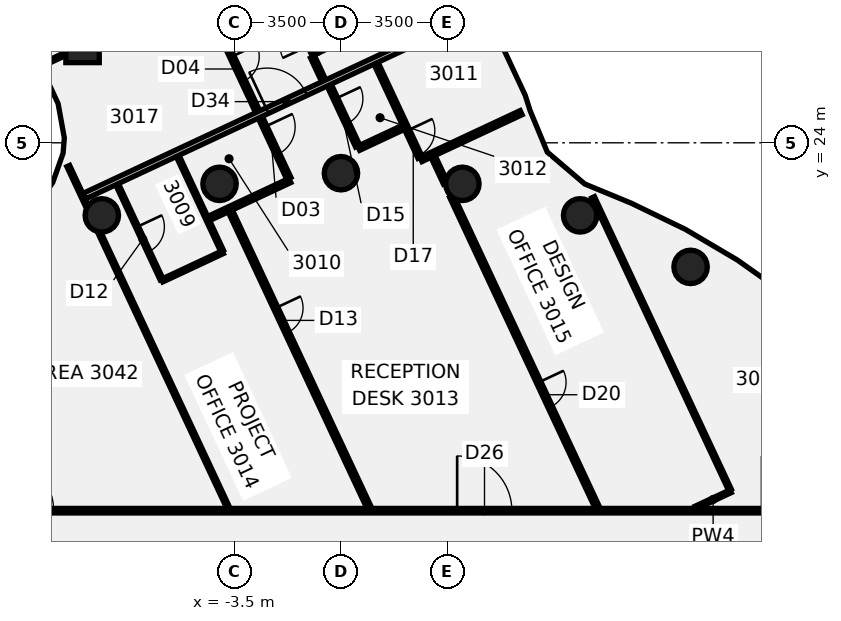
"""IFC4 building model, lengths in metres.
Left out: names, types, materials, properties, quantities, classifications, styles, units other than length and angle.
Written with IfcOpenShell. Run it as: python <this file> out.ifc"""

import sys

from ifc_helpers import new_model, si_unit, direction, frame, frame_2d, origin, origin_2d, place, context, subcontext, project, spatial, rectangle, circle, extrude, element, fill, save


model = new_model("IFC4")
c1 = context("Model", 3, precision=1e-05, world=origin(), true_north=direction((0.0, 1.0)))
c2 = subcontext(c1, "Body", "Model", "MODEL_VIEW")
j1 = project(units=[si_unit("LENGTHUNIT", "METRE"), si_unit("PLANEANGLEUNIT", "RADIAN")], contexts=[c1])
p1 = place(None, origin())
s1 = spatial("IfcSite", under=j1, at=p1, CompositionType="ELEMENT")
p2 = place(p1, origin())
s2 = spatial("IfcBuilding", under=s1, at=p2, CompositionType="ELEMENT")
p3 = place(p2, frame((0.0, 0.0, 124.75)))
s3 = spatial("IfcBuildingStorey", under=s2, at=p3, CompositionType="ELEMENT", Elevation=124.75)
for number, where, z_axis, x_axis in (
    (1, (11.5, 19.919, -0.14), (0.0, 0.0, 1.0), (1.0, 0.0, 0.0)),
    (2, (7.866, 21.613, -0.14), (0.0, 0.0, 1.0), (1.0, 0.0, 0.0)),
    (3, (3.994, 22.651, -0.14), (0.0, 0.0, 1.0), (1.0, 0.0, 0.0)),
    (4, (0.0, 23.0, -0.14), (0.0, 0.0, 1.0), (1.0, 0.0, 0.0)),
    (5, (-3.994, 22.651, -0.14), (0.0, 0.0, 1.0), (1.0, 0.0, 0.0)),
    (6, (-7.866, 21.613, -0.14), (0.0, 0.0, 1.0), (1.0, 0.0, 0.0)),
):
    element("IfcColumn", number, at=place(p3, frame(where, z_axis=z_axis, x_axis=x_axis)), inside=s3, PredefinedType="COLUMN", context=c2, shape_type="SweptSolid", body=[
        extrude(circle(Radius=0.55, at=origin_2d()), origin(), (0.0, 0.0, 1.0), 3.71),
    ])
p4 = place(p3, frame((-8.499, 27.187, -0.139), z_axis=(-0.025080401947, -0.041932325564, 0.998805613476), x_axis=(0.905336041768, 0.422762183328, 0.040481944421)))
e7 = element("IfcColumn", 7, at=p4, inside=s3, PredefinedType="COLUMN", context=c2, shape_type="SweptSolid", body=[
    extrude(rectangle(XDim=1.1, YDim=1.1, at=origin_2d()), origin(), (0.0, 0.0, 1.0), 3.709),
])
p5 = place(p3, frame((-10.294, 41.169, 0.0), z_axis=(0.0, 0.0, 1.0), x_axis=(0.423769207005, -0.905770202201, 0.0)))
e8 = element("IfcWall", 8, at=p5, inside=s3, PredefinedType="PARTITIONING", context=c2, shape_type="SweptSolid", body=[
    extrude(rectangle(XDim=20.246, YDim=0.15, at=frame_2d((10.123, 0.0))), origin(), (0.0, 0.0, 1.0), 2.87),
])
p6 = place(p5, frame((18.375, 0.0, 0.0)))
e9 = element("IfcOpeningElement", 9, at=p6, cuts=e8, PredefinedType="OPENING", context=c2, shape_type="SweptSolid", body=[
    extrude(rectangle(XDim=1.0, YDim=2.1, at=frame_2d((0.5, 1.05))), frame((0.0, 0.085, 0.0), z_axis=(0.0, -1.0, 0.0), x_axis=(1.0, 0.0, 0.0)), (0.0, 0.0, 1.0), 0.17),
])
p7 = place(p5, frame((15.825, 0.0, 0.0)))
e10 = element("IfcOpeningElement", 10, at=p7, cuts=e8, PredefinedType="OPENING", context=c2, shape_type="SweptSolid", body=[
    extrude(rectangle(XDim=0.9, YDim=2.1, at=frame_2d((0.45, 1.05))), frame((0.0, 0.085, 0.0), z_axis=(0.0, -1.0, 0.0), x_axis=(1.0, 0.0, 0.0)), (0.0, 0.0, 1.0), 0.17),
])
p8 = place(p5, frame((10.125, 0.0, 0.0)))
e11 = element("IfcOpeningElement", 11, at=p8, cuts=e8, PredefinedType="OPENING", context=c2, shape_type="SweptSolid", body=[
    extrude(rectangle(XDim=0.9, YDim=2.1, at=frame_2d((0.45, 1.05))), frame((0.0, 0.085, 0.0), z_axis=(0.0, -1.0, 0.0), x_axis=(1.0, 0.0, 0.0)), (0.0, 0.0, 1.0), 0.17),
])
p9 = place(p5, frame((6.825, 0.0, 0.0)))
e12 = element("IfcOpeningElement", 12, at=p9, cuts=e8, PredefinedType="OPENING", context=c2, shape_type="SweptSolid", body=[
    extrude(rectangle(XDim=0.9, YDim=2.1, at=frame_2d((0.45, 1.05))), frame((0.0, 0.085, 0.0), z_axis=(0.0, -1.0, 0.0), x_axis=(1.0, 0.0, 0.0)), (0.0, 0.0, 1.0), 0.17),
])
p10 = place(p5, frame((2.325, 0.0, 0.0)))
e13 = element("IfcOpeningElement", 13, at=p10, cuts=e8, PredefinedType="OPENING", context=c2, shape_type="SweptSolid", body=[
    extrude(rectangle(XDim=0.9, YDim=2.1, at=frame_2d((0.45, 1.05))), frame((0.0, 0.085, 0.0), z_axis=(0.0, -1.0, 0.0), x_axis=(1.0, 0.0, 0.0)), (0.0, 0.0, 1.0), 0.17),
])
p11 = place(p3, frame((-8.969, 23.236, 0.0), z_axis=(0.0, 0.0, 1.0), x_axis=(0.423755205879, -0.905776752567, 0.0)))
e14 = element("IfcWall", 14, at=p11, inside=s3, PredefinedType="PARTITIONING", context=c2, shape_type="SweptSolid", body=[
    extrude(rectangle(XDim=1.475, YDim=0.1, at=frame_2d((0.737, 0.0))), origin(), (0.0, 0.0, 1.0), 2.97),
])
p12 = place(p3, frame((-7.96, 21.078, 0.0), z_axis=(0.0, 0.0, 1.0), x_axis=(0.423844267344, -0.905735081047, 0.0)))
e15 = element("IfcWall", 15, at=p12, inside=s3, PredefinedType="PARTITIONING", context=c2, shape_type="SweptSolid", body=[
    extrude(rectangle(XDim=10.048, YDim=0.1, at=frame_2d((5.024, 0.0))), origin(), (0.0, 0.0, 1.0), 2.97),
])
p13 = place(p3, frame((-0.931, 26.82, 0.0), z_axis=(0.0, 0.0, 1.0), x_axis=(0.423786528485, -0.905762098056, 0.0)))
e16 = element("IfcWall", 16, at=p13, inside=s3, PredefinedType="PARTITIONING", context=c2, shape_type="SweptSolid", body=[
    extrude(rectangle(XDim=0.86, YDim=0.15, at=frame_2d((0.43, 0.0))), origin(), (0.0, 0.0, 1.0), 2.87),
])
p14 = place(p3, frame((-7.365, 22.638, 0.0), z_axis=(0.0, 0.0, 1.0), x_axis=(0.423671993632, -0.905815677614, 0.0)))
e17 = element("IfcWall", 17, at=p14, inside=s3, PredefinedType="PARTITIONING", context=c2, shape_type="SweptSolid", body=[
    extrude(rectangle(XDim=3.449, YDim=0.1, at=frame_2d((1.724, 0.0))), origin(), (0.0, 0.0, 1.0), 2.87),
])
p15 = place(p14, frame((1.55, 0.0, 0.0)))
e18 = element("IfcOpeningElement", 18, at=p15, cuts=e17, PredefinedType="OPENING", context=c2, shape_type="SweptSolid", body=[
    extrude(rectangle(XDim=0.9, YDim=2.1, at=frame_2d((0.45, 1.05))), frame((0.0, 0.06, 0.0), z_axis=(0.0, -1.0, 0.0), x_axis=(1.0, 0.0, 0.0)), (0.0, 0.0, 1.0), 0.12),
])
p16 = place(p3, frame((-5.371, 23.567, 0.0), z_axis=(0.0, 0.0, 1.0), x_axis=(0.423878271215, -0.90571916795, 0.0)))
e19 = element("IfcWall", 19, at=p16, inside=s3, PredefinedType="PARTITIONING", context=c2, shape_type="SweptSolid", body=[
    extrude(rectangle(XDim=3.446, YDim=0.1, at=frame_2d((1.723, 0.0))), origin(), (0.0, 0.0, 1.0), 2.87),
])
p17 = place(p3, frame((-3.641, 21.759, 0.0), z_axis=(0.0, 0.0, 1.0), x_axis=(0.423809726716, -0.905751243743, 0.0)))
e20 = element("IfcWall", 20, at=p17, inside=s3, PredefinedType="PARTITIONING", context=c2, shape_type="SweptSolid", body=[
    extrude(rectangle(XDim=10.785, YDim=0.15, at=frame_2d((5.393, 0.0))), origin(), (0.0, 0.0, 1.0), 2.97),
])
p18 = place(p17, frame((3.525, 0.0, 0.0)))
e21 = element("IfcOpeningElement", 21, at=p18, cuts=e20, PredefinedType="OPENING", context=c2, shape_type="SweptSolid", body=[
    extrude(rectangle(XDim=0.9, YDim=2.1, at=frame_2d((0.45, 1.05))), frame((0.0, 0.085, 0.0), z_axis=(0.0, -1.0, 0.0), x_axis=(1.0, 0.0, 0.0)), (0.0, 0.0, 1.0), 0.17),
])
p19 = place(p3, frame((-0.388, 25.898, 0.0), z_axis=(0.0, 0.0, 1.0), x_axis=(0.423693860777, -0.905805449498, 0.0)))
e22 = element("IfcWall", 22, at=p19, inside=s3, PredefinedType="PARTITIONING", context=c2, shape_type="SweptSolid", body=[
    extrude(rectangle(XDim=2.215, YDim=0.15, at=frame_2d((1.107, 0.0))), origin(), (0.0, 0.0, 1.0), 2.97),
])
p20 = place(p19, frame((0.495, 0.0, 0.0)))
e23 = element("IfcOpeningElement", 23, at=p20, cuts=e22, PredefinedType="OPENING", context=c2, shape_type="SweptSolid", body=[
    extrude(rectangle(XDim=0.9, YDim=2.1, at=frame_2d((0.45, 1.05))), frame((0.0, 0.085, 0.0), z_axis=(0.0, -1.0, 0.0), x_axis=(1.0, 0.0, 0.0)), (0.0, 0.0, 1.0), 0.17),
])
p21 = place(p3, frame((1.152, 26.618, 0.0), z_axis=(0.0, 0.0, 1.0), x_axis=(0.423667153788, -0.905817941311, 0.0)))
e24 = element("IfcWall", 24, at=p21, inside=s3, PredefinedType="PARTITIONING", context=c2, shape_type="SweptSolid", body=[
    extrude(rectangle(XDim=3.419, YDim=0.15, at=frame_2d((1.709, 0.0))), origin(), (0.0, 0.0, 1.0), 2.97),
])
p22 = place(p21, frame((2.444, 0.0, 0.0)))
e25 = element("IfcOpeningElement", 25, at=p22, cuts=e24, PredefinedType="OPENING", context=c2, shape_type="SweptSolid", body=[
    extrude(rectangle(XDim=0.9, YDim=2.1, at=frame_2d((0.45, 1.05))), frame((0.0, 0.085, 0.0), z_axis=(0.0, -1.0, 0.0), x_axis=(1.0, 0.0, 0.0)), (0.0, 0.0, 1.0), 0.17),
])
p23 = place(p3, frame((3.029, 23.551, 0.0), z_axis=(0.0, 0.0, 1.0), x_axis=(0.423795074158, -0.905758099671, 0.0)))
e26 = element("IfcWall", 26, at=p23, inside=s3, PredefinedType="PARTITIONING", context=c2, shape_type="SweptSolid", body=[
    extrude(rectangle(XDim=0.969, YDim=0.15, at=frame_2d((0.485, 0.0))), origin(), (0.0, 0.0, 1.0), 2.97),
])
p24 = place(p3, frame((3.644, 22.235, 0.0), z_axis=(0.0, 0.0, 1.0), x_axis=(0.423784513988, -0.905763040593, 0.0)))
e27 = element("IfcWall", 27, at=p24, inside=s3, PredefinedType="PARTITIONING", context=c2, shape_type="SweptSolid", body=[
    extrude(rectangle(XDim=11.311, YDim=0.15, at=frame_2d((5.655, 0.0))), origin(), (0.0, 0.0, 1.0), 2.97),
])
p25 = place(p24, frame((6.75, 0.0, 0.0)))
e28 = element("IfcOpeningElement", 28, at=p25, cuts=e27, PredefinedType="OPENING", context=c2, shape_type="SweptSolid", body=[
    extrude(rectangle(XDim=0.9, YDim=2.1, at=frame_2d((0.45, 1.05))), frame((0.0, 0.085, 0.0), z_axis=(0.0, -1.0, 0.0), x_axis=(1.0, 0.0, 0.0)), (0.0, 0.0, 1.0), 0.17),
])
p26 = place(p3, frame((8.293, 22.208, 0.0), z_axis=(0.0, 0.0, 1.0), x_axis=(0.423833818266, -0.905739970684, 0.0)))
e29 = element("IfcWall", 29, at=p26, inside=s3, PredefinedType="PARTITIONING", context=c2, shape_type="SweptSolid", body=[
    extrude(rectangle(XDim=10.624, YDim=0.1, at=frame_2d((5.312, 0.0))), origin(), (0.0, 0.0, 1.0), 2.97),
])
p27 = place(p3, frame((-17.065, 11.9, 0.0), z_axis=(0.0, 0.0, 1.0), x_axis=(1.0, 0.0, 0.0)))
e30 = element("IfcWall", 30, at=p27, inside=s3, PredefinedType="PARTITIONING", context=c2, shape_type="SweptSolid", body=[
    extrude(rectangle(XDim=34.165, YDim=0.15, at=frame_2d((17.083, 0.0))), origin(), (0.0, 0.0, 1.0), 2.97),
])
p28 = place(p27, frame((20.887, 0.0, 0.0)))
e31 = element("IfcOpeningElement", 31, at=p28, cuts=e30, PredefinedType="OPENING", context=c2, shape_type="SweptSolid", body=[
    extrude(rectangle(XDim=1.8, YDim=2.1, at=frame_2d((0.9, 1.05))), frame((0.0, 0.085, 0.0), z_axis=(0.0, -1.0, 0.0), x_axis=(1.0, 0.0, 0.0)), (0.0, 0.0, 1.0), 0.17),
])
p29 = place(p27, frame((30.913, 0.0, 0.0)))
e32 = element("IfcOpeningElement", 32, at=p29, cuts=e30, PredefinedType="OPENING", context=c2, shape_type="SweptSolid", body=[
    extrude(rectangle(XDim=1.8, YDim=2.1, at=frame_2d((0.9, 1.05))), frame((0.0, 0.085, 0.0), z_axis=(0.0, -1.0, 0.0), x_axis=(1.0, 0.0, 0.0)), (0.0, 0.0, 1.0), 0.17),
])
p30 = place(p27, frame((5.815, 0.0, 0.0)))
e33 = element("IfcOpeningElement", 33, at=p30, cuts=e30, PredefinedType="OPENING", context=c2, shape_type="SweptSolid", body=[
    extrude(rectangle(XDim=1.8, YDim=2.1, at=frame_2d((0.9, 1.05))), frame((0.0, 0.085, 0.0), z_axis=(0.0, -1.0, 0.0), x_axis=(1.0, 0.0, 0.0)), (0.0, 0.0, 1.0), 0.17),
])
p31 = place(p3, frame((11.666, 12.0, 0.0), z_axis=(0.0, 0.0, 1.0), x_axis=(0.905726309161, 0.423863011942, 0.0)))
e34 = element("IfcWall", 34, at=p31, inside=s3, PredefinedType="PARTITIONING", context=c2, shape_type="SweptSolid", body=[
    extrude(rectangle(XDim=1.271, YDim=0.1, at=frame_2d((0.636, 0.0))), origin(), (0.0, 0.0, 1.0), 2.97),
])
p32 = place(p3, frame((-9.613, 26.666, 0.0), z_axis=(0.0, 0.0, 1.0), x_axis=(0.905887159872, 0.423519130121, 0.0)))
e35 = element("IfcWall", 35, at=p32, inside=s3, PredefinedType="PARTITIONING", context=c2, shape_type="SweptSolid", body=[
    extrude(rectangle(XDim=0.506, YDim=0.1, at=frame_2d((0.253, 0.0))), origin(), (0.0, 0.0, 1.0), 2.97),
])
p33 = place(p3, frame((-8.44, 22.246, 0.0), z_axis=(0.0, 0.0, 1.0), x_axis=(0.905948211467, 0.423388519139, 0.0)))
e36 = element("IfcWall", 36, at=p33, inside=s3, PredefinedType="PARTITIONING", context=c2, shape_type="SweptSolid", body=[
    extrude(rectangle(XDim=14.239, YDim=0.2, at=frame_2d((7.119, 0.0))), origin(), (0.0, 0.0, 1.0), 2.87),
])
p34 = place(p33, frame((6.64, 0.0, 0.0)))
e37 = element("IfcOpeningElement", 37, at=p34, cuts=e36, PredefinedType="OPENING", context=c2, shape_type="SweptSolid", body=[
    extrude(rectangle(XDim=1.4, YDim=2.1, at=frame_2d((0.7, 1.05))), frame((0.0, 0.11, 0.0), z_axis=(0.0, -1.0, 0.0), x_axis=(1.0, 0.0, 0.0)), (0.0, 0.0, 1.0), 0.22),
])
p35 = place(p3, frame((-5.882, 19.469, 0.0), z_axis=(0.0, 0.0, 1.0), x_axis=(0.905879588514, 0.423535324517, 0.0)))
e38 = element("IfcWall", 38, at=p35, inside=s3, PredefinedType="PARTITIONING", context=c2, shape_type="SweptSolid", body=[
    extrude(rectangle(XDim=2.2, YDim=0.1, at=frame_2d((1.1, 0.0))), origin(), (0.0, 0.0, 1.0), 2.97),
])
p36 = place(p3, frame((2.633, 23.451, 0.0), z_axis=(0.0, 0.0, 1.0), x_axis=(0.905831155587, 0.42363889997, 0.0)))
e39 = element("IfcWall", 39, at=p36, inside=s3, PredefinedType="PARTITIONING", context=c2, shape_type="SweptSolid", body=[
    extrude(rectangle(XDim=3.636, YDim=0.15, at=frame_2d((1.818, 0.0))), origin(), (0.0, 0.0, 1.0), 2.97),
])
p37 = place(p3, frame((-4.352, 21.509, 0.0), z_axis=(0.0, 0.0, 1.0), x_axis=(0.905651681577, 0.424022442398, 0.0)))
e40 = element("IfcWall", 40, at=p37, inside=s3, PredefinedType="PARTITIONING", context=c2, shape_type="SweptSolid", body=[
    extrude(rectangle(XDim=2.95, YDim=0.15, at=frame_2d((1.475, 0.0))), origin(), (0.0, 0.0, 1.0), 2.87),
])
p38 = place(p3, frame((0.583, 23.82, 0.0), z_axis=(0.0, 0.0, 1.0), x_axis=(0.905668132329, 0.423987304153, 0.0)))
e41 = element("IfcWall", 41, at=p38, inside=s3, PredefinedType="PARTITIONING", context=c2, shape_type="SweptSolid", body=[
    extrude(rectangle(XDim=1.625, YDim=0.15, at=frame_2d((0.812, 0.0))), origin(), (0.0, 0.0, 1.0), 2.97),
])
p39 = place(p3, frame((-0.857, 26.899, -0.14), z_axis=(0.0, 0.0, 1.0), x_axis=(-0.423828808535, 0.90574231493, 0.0)))
e42 = element("IfcWall", 42, at=p39, inside=s3, PredefinedType="SHEAR", context=c2, shape_type="SweptSolid", body=[
    extrude(rectangle(XDim=6.7, YDim=0.2, at=frame_2d((3.35, 0.0))), origin(), (0.0, 0.0, 1.0), 3.01),
])
p40 = place(p39, frame((0.35, 0.0, 0.0)))
e43 = element("IfcOpeningElement", 43, at=p40, cuts=e42, PredefinedType="OPENING", context=c2, shape_type="SweptSolid", body=[
    extrude(rectangle(XDim=1.0, YDim=2.1, at=frame_2d((0.5, 1.05))), frame((0.0, 0.11, 0.0), z_axis=(0.0, -1.0, 0.0), x_axis=(1.0, 0.0, 0.0)), (0.0, 0.0, 1.0), 0.22),
])
p41 = place(p3, frame((2.09, 28.388, -0.14), z_axis=(0.0, 0.0, 1.0), x_axis=(-0.905751920053, -0.423808281325, 0.0)))
e44 = element("IfcWall", 44, at=p41, inside=s3, PredefinedType="SHEAR", context=c2, shape_type="SweptSolid", body=[
    extrude(rectangle(XDim=3.2, YDim=0.2, at=frame_2d((1.6, 0.0))), origin(), (0.0, 0.0, 1.0), 3.01),
])
p42 = place(p6, frame((1.0, 0.0, 0.0), z_axis=(0.0, 0.0, 1.0), x_axis=(-1.0, 0.0, 0.0)))
e45 = element("IfcDoor", 45, at=p42, inside=s3, OperationType="SINGLE_SWING_RIGHT", PredefinedType="DOOR", context=c2, shape_type="SweptSolid", body=[
    extrude(rectangle(XDim=1.0, YDim=2.1, at=frame_2d((0.5, 1.05))), frame((0.0, 0.025, 0.0), z_axis=(0.0, -1.0, 0.0), x_axis=(1.0, 0.0, 0.0)), (0.0, 0.0, 1.0), 0.05),
])
fill(e9, e45)
p43 = place(p7, frame((0.9, 0.0, 0.0), z_axis=(0.0, 0.0, 1.0), x_axis=(-1.0, 0.0, 0.0)))
e46 = element("IfcDoor", 46, at=p43, inside=s3, OperationType="SINGLE_SWING_RIGHT", PredefinedType="DOOR", context=c2, shape_type="SweptSolid", body=[
    extrude(rectangle(XDim=0.9, YDim=2.1, at=frame_2d((0.45, 1.05))), frame((0.0, 0.025, 0.0), z_axis=(0.0, -1.0, 0.0), x_axis=(1.0, 0.0, 0.0)), (0.0, 0.0, 1.0), 0.05),
])
fill(e10, e46)
p44 = place(p15, origin())
e47 = element("IfcDoor", 47, at=p44, inside=s3, OperationType="SINGLE_SWING_LEFT", PredefinedType="DOOR", context=c2, shape_type="SweptSolid", body=[
    extrude(rectangle(XDim=0.9, YDim=2.1, at=frame_2d((0.45, 1.05))), frame((0.0, 0.025, 0.0), z_axis=(0.0, -1.0, 0.0), x_axis=(1.0, 0.0, 0.0)), (0.0, 0.0, 1.0), 0.05),
])
fill(e18, e47)
p45 = place(p18, frame((0.9, 0.0, 0.0), z_axis=(0.0, 0.0, 1.0), x_axis=(-1.0, 0.0, 0.0)))
e48 = element("IfcDoor", 48, at=p45, inside=s3, OperationType="SINGLE_SWING_LEFT", PredefinedType="DOOR", context=c2, shape_type="SweptSolid", body=[
    extrude(rectangle(XDim=0.9, YDim=2.1, at=frame_2d((0.45, 1.05))), frame((0.0, 0.025, 0.0), z_axis=(0.0, -1.0, 0.0), x_axis=(1.0, 0.0, 0.0)), (0.0, 0.0, 1.0), 0.05),
])
fill(e21, e48)
p46 = place(p20, origin())
e49 = element("IfcDoor", 49, at=p46, inside=s3, OperationType="SINGLE_SWING_RIGHT", PredefinedType="DOOR", context=c2, shape_type="SweptSolid", body=[
    extrude(rectangle(XDim=0.9, YDim=2.1, at=frame_2d((0.45, 1.05))), frame((0.0, 0.025, 0.0), z_axis=(0.0, -1.0, 0.0), x_axis=(1.0, 0.0, 0.0)), (0.0, 0.0, 1.0), 0.05),
])
fill(e23, e49)
p47 = place(p22, origin())
e50 = element("IfcDoor", 50, at=p47, inside=s3, OperationType="SINGLE_SWING_LEFT", PredefinedType="DOOR", context=c2, shape_type="SweptSolid", body=[
    extrude(rectangle(XDim=0.9, YDim=2.1, at=frame_2d((0.45, 1.05))), frame((0.0, 0.025, 0.0), z_axis=(0.0, -1.0, 0.0), x_axis=(1.0, 0.0, 0.0)), (0.0, 0.0, 1.0), 0.05),
])
fill(e25, e50)
p48 = place(p25, origin())
e51 = element("IfcDoor", 51, at=p48, inside=s3, OperationType="SINGLE_SWING_LEFT", PredefinedType="DOOR", context=c2, shape_type="SweptSolid", body=[
    extrude(rectangle(XDim=0.9, YDim=2.1, at=frame_2d((0.45, 1.05))), frame((0.0, 0.025, 0.0), z_axis=(0.0, -1.0, 0.0), x_axis=(1.0, 0.0, 0.0)), (0.0, 0.0, 1.0), 0.05),
])
fill(e28, e51)
p49 = place(p28, frame((1.8, 0.0, 0.0), z_axis=(0.0, 0.0, 1.0), x_axis=(-1.0, 0.0, 0.0)))
e52 = element("IfcDoor", 52, at=p49, inside=s3, OperationType="DOUBLE_DOOR_SINGLE_SWING", PredefinedType="DOOR", context=c2, shape_type="SweptSolid", body=[
    extrude(rectangle(XDim=1.8, YDim=2.1, at=frame_2d((0.9, 1.05))), frame((0.0, 0.025, 0.0), z_axis=(0.0, -1.0, 0.0), x_axis=(1.0, 0.0, 0.0)), (0.0, 0.0, 1.0), 0.05),
])
fill(e31, e52)
p50 = place(p30, origin())
e53 = element("IfcDoor", 53, at=p50, inside=s3, OperationType="DOUBLE_DOOR_SINGLE_SWING", PredefinedType="DOOR", context=c2, shape_type="SweptSolid", body=[
    extrude(rectangle(XDim=1.8, YDim=2.1, at=frame_2d((0.9, 1.05))), frame((0.0, 0.025, 0.0), z_axis=(0.0, -1.0, 0.0), x_axis=(1.0, 0.0, 0.0)), (0.0, 0.0, 1.0), 0.05),
])
fill(e33, e53)
p51 = place(p34, frame((1.4, 0.0, 0.0), z_axis=(0.0, 0.0, 1.0), x_axis=(-1.0, 0.0, 0.0)))
e54 = element("IfcDoor", 54, at=p51, inside=s3, OperationType="DOUBLE_DOOR_SINGLE_SWING", PredefinedType="DOOR", context=c2, shape_type="SweptSolid", body=[
    extrude(rectangle(XDim=1.4, YDim=2.1, at=frame_2d((0.7, 1.05))), frame((0.0, 0.025, 0.0), z_axis=(0.0, -1.0, 0.0), x_axis=(1.0, 0.0, 0.0)), (0.0, 0.0, 1.0), 0.05),
])
fill(e37, e54)
save(model, sys.argv[1])
